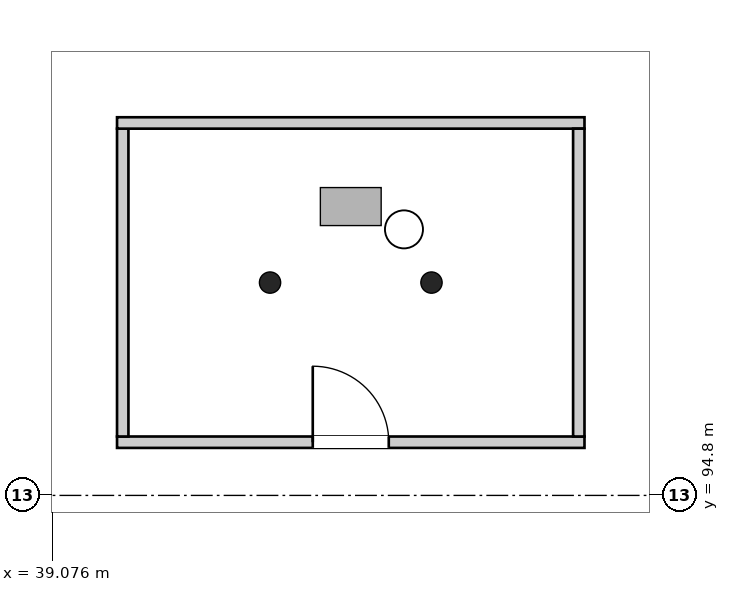
"""IFC4 building model, lengths in metres.
Left out: names, types, materials, properties, quantities, classifications, styles, units other than length and angle.
Written with IfcOpenShell. Run it as: python <this file> out.ifc"""

import sys

from ifc_helpers import new_model, si_unit, direction, frame, frame_2d, origin, place, context, subcontext, project, spatial, rectangle, extrude, element, fill, save


model = new_model("IFC4")
c1 = context("Model", 3, precision=1e-05, world=origin(), true_north=direction((0.0, 1.0)))
c2 = subcontext(c1, "Body", "Model", "MODEL_VIEW")
j1 = project(units=[si_unit("LENGTHUNIT", "METRE"), si_unit("PLANEANGLEUNIT", "RADIAN")], contexts=[c1])
p1 = place(None, origin())
s1 = spatial("IfcSite", under=j1, at=p1, CompositionType="ELEMENT")
p2 = place(p1, origin())
s2 = spatial("IfcBuilding", under=s1, at=p2, CompositionType="ELEMENT")
p3 = place(p2, frame((0.0, 0.0, 26.7)))
s3 = spatial("IfcBuildingStorey", under=s2, at=p3, CompositionType="ELEMENT", Elevation=26.7)
p4 = place(p3, frame((39.925, 95.5, 0.0), z_axis=(0.0, 0.0, 1.0), x_axis=(1.0, 0.0, 0.0)))
e1 = element("IfcWall", 1, at=p4, inside=s3, PredefinedType="PARTITIONING", context=c2, shape_type="SweptSolid", body=[
    extrude(rectangle(XDim=6.15, YDim=0.15, at=frame_2d((3.075, 0.0))), origin(), (0.0, 0.0, 1.0), 4.85),
])
p5 = place(p4, frame((2.575, 0.0, 0.0)))
e2 = element("IfcOpeningElement", 2, at=p5, cuts=e1, PredefinedType="OPENING", context=c2, shape_type="SweptSolid", body=[
    extrude(rectangle(XDim=1.0, YDim=2.1, at=frame_2d((0.5, 1.05))), frame((0.0, 0.085, 0.0), z_axis=(0.0, -1.0, 0.0), x_axis=(1.0, 0.0, 0.0)), (0.0, 0.0, 1.0), 0.17),
])
p6 = place(p3, frame((40.0, 95.575, 0.0), z_axis=(0.0, 0.0, 1.0), x_axis=(0.0, 1.0, 0.0)))
e3 = element("IfcWall", 3, at=p6, inside=s3, PredefinedType="PARTITIONING", context=c2, shape_type="SweptSolid", body=[
    extrude(rectangle(XDim=4.05, YDim=0.15, at=frame_2d((2.025, 0.0))), origin(), (0.0, 0.0, 1.0), 4.85),
])
p7 = place(p3, frame((39.925, 99.7, 0.0), z_axis=(0.0, 0.0, 1.0), x_axis=(1.0, 0.0, 0.0)))
e4 = element("IfcWall", 4, at=p7, inside=s3, PredefinedType="PARTITIONING", context=c2, shape_type="SweptSolid", body=[
    extrude(rectangle(XDim=6.15, YDim=0.15, at=frame_2d((3.075, 0.0))), origin(), (0.0, 0.0, 1.0), 4.85),
])
p8 = place(p3, frame((46.0, 95.575, 0.0), z_axis=(0.0, 0.0, 1.0), x_axis=(0.0, 1.0, 0.0)))
e5 = element("IfcWall", 5, at=p8, inside=s3, PredefinedType="PARTITIONING", context=c2, shape_type="SweptSolid", body=[
    extrude(rectangle(XDim=4.05, YDim=0.15, at=frame_2d((2.025, 0.0))), origin(), (0.0, 0.0, 1.0), 4.85),
])
p9 = place(p5, origin())
e6 = element("IfcDoor", 6, at=p9, inside=s3, OperationType="SINGLE_SWING_LEFT", PredefinedType="DOOR", context=c2, shape_type="SweptSolid", body=[
    extrude(rectangle(XDim=1.0, YDim=2.1, at=frame_2d((0.5, 1.05))), frame((0.0, 0.025, 0.0), z_axis=(0.0, -1.0, 0.0), x_axis=(1.0, 0.0, 0.0)), (0.0, 0.0, 1.0), 0.05),
])
fill(e2, e6)
save(model, sys.argv[1])
